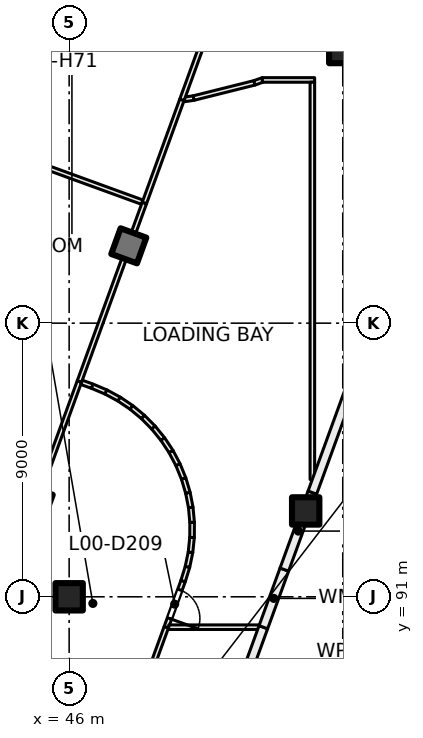
"""IFC4 building model, lengths in metres.
Left out: names, types, materials, properties, quantities, classifications, styles, units other than length and angle.
Written with IfcOpenShell. Run it as: python <this file> out.ifc"""

import sys

from ifc_helpers import new_model, si_unit, direction, frame, frame_2d, origin, origin_2d, place, context, subcontext, project, spatial, rectangle, extrude, element, fill, save


model = new_model("IFC4")
c1 = context("Model", 3, precision=1e-05, world=origin(), true_north=direction((0.0, 1.0)))
c2 = subcontext(c1, "Body", "Model", "MODEL_VIEW")
j1 = project(units=[si_unit("LENGTHUNIT", "METRE"), si_unit("PLANEANGLEUNIT", "RADIAN")], contexts=[c1])
p1 = place(None, origin())
s1 = spatial("IfcSite", under=j1, at=p1, CompositionType="ELEMENT")
p2 = place(p1, origin())
s2 = spatial("IfcBuilding", under=s1, at=p2, CompositionType="ELEMENT")
p3 = place(p2, origin())
s3 = spatial("IfcBuildingStorey", under=s2, at=p3, CompositionType="ELEMENT", Elevation=0.0)
for number, where, z_axis, x_axis in (
    (1, (46.0, 91.0, 0.0), (0.0, 0.0, 1.0), (1.0, 0.0, 0.0)),
    (2, (55.0, 109.0, 0.0), (0.0, 0.0, 1.0), (1.0, 0.0, 0.0)),
    (3, (53.78, 93.824, 0.0), (0.0, 0.0, 1.0), (1.0, 0.0, 0.0)),
    (4, (47.962, 102.544, 0.0), (0.0, 0.0, 1.0), (-0.342, -0.94, 0.0)),
    (5, (44.884, 94.087, 0.0), (0.0, 0.0, 1.0), (-0.342, -0.94, 0.0)),
):
    element("IfcColumn", number, at=place(p3, frame(where, z_axis=z_axis, x_axis=x_axis)), inside=s3, PredefinedType="COLUMN", context=c2, shape_type="SweptSolid", body=[
        extrude(rectangle(XDim=0.9, YDim=0.9, at=origin_2d()), origin(), (0.0, 0.0, 1.0), 7.5),
    ])
p4 = place(p3, frame((40.44, 106.878, 0.0), z_axis=(0.0, 0.0, 1.0), x_axis=(0.939697516706, -0.342006691597, 0.0)))
e6 = element("IfcWall", 6, at=p4, inside=s3, PredefinedType="PARTITIONING", context=c2, shape_type="SweptSolid", body=[
    extrude(rectangle(XDim=8.476, YDim=0.15, at=frame_2d((4.238, 0.0))), origin(), (0.0, 0.0, 1.0), 7.1),
])
p5 = place(p3, frame((44.627, 93.382, 0.0), z_axis=(0.0, 0.0, 1.0), x_axis=(0.342025351501, 0.939690725149, 0.0)))
e7 = element("IfcWall", 7, at=p5, inside=s3, PredefinedType="PARTITIONING", context=c2, shape_type="SweptSolid", body=[
    extrude(rectangle(XDim=5.0, YDim=0.15, at=frame_2d((2.5, 0.0))), origin(), (0.0, 0.0, 1.0), 7.1),
])
p6 = place(p3, frame((46.407, 98.054, 0.0), z_axis=(0.0, 0.0, 1.0), x_axis=(0.939944328342, -0.341327789109, 0.0)))
e8 = element("IfcWall", 8, at=p6, inside=s3, PredefinedType="PARTITIONING", context=c2, shape_type="SweptSolid", body=[
    extrude(rectangle(XDim=0.378, YDim=0.15, at=frame_2d((0.189, 0.0))), origin(), (0.0, 0.0, 1.0), 7.1),
])
p7 = place(p3, frame((46.337, 98.08, 0.0), z_axis=(0.0, 0.0, 1.0), x_axis=(0.342113136459, 0.939658768842, 0.0)))
e9 = element("IfcWall", 9, at=p7, inside=s3, PredefinedType="PARTITIONING", context=c2, shape_type="SweptSolid", body=[
    extrude(rectangle(XDim=6.25, YDim=0.15, at=frame_2d((3.125, 0.0))), origin(), (0.0, 0.0, 1.0), 7.1),
])
p8 = place(p3, frame((46.758, 97.927, 0.0), z_axis=(0.0, 0.0, 1.0), x_axis=(0.922024303007, -0.387131999019, 0.0)))
e10 = element("IfcWall", 10, at=p8, inside=s3, PredefinedType="PARTITIONING", context=c2, shape_type="SweptSolid", body=[
    extrude(rectangle(XDim=0.496, YDim=0.15, at=frame_2d((0.248, 0.0))), origin(), (0.0, 0.0, 1.0), 7.1),
])
p9 = place(p3, frame((47.209, 97.738, 0.0), z_axis=(0.0, 0.0, 1.0), x_axis=(0.878624509573, -0.47751332042, 0.0)))
e11 = element("IfcWall", 11, at=p9, inside=s3, PredefinedType="PARTITIONING", context=c2, shape_type="SweptSolid", body=[
    extrude(rectangle(XDim=0.499, YDim=0.15, at=frame_2d((0.249, 0.0))), origin(), (0.0, 0.0, 1.0), 7.1),
])
p10 = place(p3, frame((49.196, 90.0, 0.0), z_axis=(0.0, 0.0, 1.0), x_axis=(-0.34191897106, -0.939729438312, 0.0)))
e12 = element("IfcWall", 12, at=p10, inside=s3, PredefinedType="PARTITIONING", context=c2, shape_type="SweptSolid", body=[
    extrude(rectangle(XDim=5.46, YDim=0.15, at=frame_2d((2.73, 0.0))), origin(), (0.0, 0.0, 1.0), 7.1),
])
p11 = place(p10, frame((1.883, 0.0, 0.0)))
e13 = element("IfcOpeningElement", 13, at=p11, cuts=e12, PredefinedType="OPENING", context=c2, shape_type="SweptSolid", body=[
    extrude(rectangle(XDim=1.8, YDim=2.1, at=frame_2d((0.9, 1.05))), frame((0.0, 0.085, 0.0), z_axis=(0.0, -1.0, 0.0), x_axis=(1.0, 0.0, 0.0)), (0.0, 0.0, 1.0), 0.17),
])
p12 = place(p3, frame((47.641, 97.504, 0.0), z_axis=(0.0, 0.0, 1.0), x_axis=(0.829013848944, -0.559228073561, 0.0)))
e14 = element("IfcWall", 14, at=p12, inside=s3, PredefinedType="PARTITIONING", context=c2, shape_type="SweptSolid", body=[
    extrude(rectangle(XDim=0.497, YDim=0.15, at=frame_2d((0.249, 0.0))), origin(), (0.0, 0.0, 1.0), 7.1),
])
p13 = place(p3, frame((48.047, 97.23, 0.0), z_axis=(0.0, 0.0, 1.0), x_axis=(0.770145329221, -0.637868459699, 0.0)))
e15 = element("IfcWall", 15, at=p13, inside=s3, PredefinedType="PARTITIONING", context=c2, shape_type="SweptSolid", body=[
    extrude(rectangle(XDim=0.498, YDim=0.15, at=frame_2d((0.249, 0.0))), origin(), (0.0, 0.0, 1.0), 7.1),
])
p14 = place(p3, frame((48.425, 96.917, 0.0), z_axis=(0.0, 0.0, 1.0), x_axis=(0.702936615275, -0.711252497293, 0.0)))
e16 = element("IfcWall", 16, at=p14, inside=s3, PredefinedType="PARTITIONING", context=c2, shape_type="SweptSolid", body=[
    extrude(rectangle(XDim=0.499, YDim=0.15, at=frame_2d((0.25, 0.0))), origin(), (0.0, 0.0, 1.0), 7.1),
])
p15 = place(p3, frame((48.475, 103.953, 0.0), z_axis=(0.0, 0.0, 1.0), x_axis=(0.341992779494, 0.939702579955, 0.0)))
e17 = element("IfcWall", 17, at=p15, inside=s3, PredefinedType="PARTITIONING", context=c2, shape_type="SweptSolid", body=[
    extrude(rectangle(XDim=3.611, YDim=0.15, at=frame_2d((1.805, 0.0))), origin(), (0.0, 0.0, 1.0), 7.1),
])
for number, where, z_axis, x_axis in (
    (18, (48.771, 96.568, 0.0), (0.0, 0.0, 1.0), (0.629, -0.778, 0.0)),
    (19, (49.08, 96.187, 0.0), (0.0, 0.0, 1.0), (0.552, -0.834, 0.0)),
):
    element("IfcWall", number, at=place(p3, frame(where, z_axis=z_axis, x_axis=x_axis)), inside=s3, PredefinedType="PARTITIONING", context=c2, shape_type="SweptSolid", body=[
        extrude(rectangle(XDim=0.498, YDim=0.15, at=frame_2d((0.249, 0.0))), origin(), (0.0, 0.0, 1.0), 7.1),
    ])
p16 = place(p3, frame((49.749, 91.52, 0.0), z_axis=(0.0, 0.0, 1.0), x_axis=(-0.341876370555, -0.93974493734, 0.0)))
e20 = element("IfcWall", 20, at=p16, inside=s3, PredefinedType="PARTITIONING", context=c2, shape_type="SweptSolid", body=[
    extrude(rectangle(XDim=1.617, YDim=0.15, at=frame_2d((0.809, 0.0))), origin(), (0.0, 0.0, 1.0), 7.1),
])
p17 = place(p16, frame((0.311, 0.0, 0.0)))
e21 = element("IfcOpeningElement", 21, at=p17, cuts=e20, PredefinedType="OPENING", context=c2, shape_type="SweptSolid", body=[
    extrude(rectangle(XDim=1.0, YDim=2.1, at=frame_2d((0.5, 1.05))), frame((0.0, 0.085, 0.0), z_axis=(0.0, -1.0, 0.0), x_axis=(1.0, 0.0, 0.0)), (0.0, 0.0, 1.0), 0.17),
])
p18 = place(p3, frame((49.276, 90.0, 0.0), z_axis=(0.0, 0.0, 1.0), x_axis=(1.0, 0.0, 0.0)))
e22 = element("IfcWall", 22, at=p18, inside=s3, PredefinedType="PARTITIONING", context=c2, shape_type="SweptSolid", body=[
    extrude(rectangle(XDim=2.952, YDim=0.15, at=frame_2d((1.476, 0.0))), origin(), (0.0, 0.0, 1.0), 7.1),
])
p19 = place(p3, frame((49.351, 95.778, 0.0), z_axis=(0.0, 0.0, 1.0), x_axis=(0.46615085347, -0.884705251374, 0.0)))
e23 = element("IfcWall", 23, at=p19, inside=s3, PredefinedType="PARTITIONING", context=c2, shape_type="SweptSolid", body=[
    extrude(rectangle(XDim=0.498, YDim=0.15, at=frame_2d((0.249, 0.0))), origin(), (0.0, 0.0, 1.0), 7.1),
])
p20 = place(p3, frame((49.58, 95.344, 0.0), z_axis=(0.0, 0.0, 1.0), x_axis=(0.378326719955, -0.925672130383, 0.0)))
e24 = element("IfcWall", 24, at=p20, inside=s3, PredefinedType="PARTITIONING", context=c2, shape_type="SweptSolid", body=[
    extrude(rectangle(XDim=0.497, YDim=0.15, at=frame_2d((0.249, 0.0))), origin(), (0.0, 0.0, 1.0), 7.1),
])
p21 = place(p3, frame((49.794, 107.359, 0.0), z_axis=(0.0, 0.0, 1.0), x_axis=(0.988901730308, 0.148571086668, 0.0)))
e25 = element("IfcWall", 25, at=p21, inside=s3, PredefinedType="PARTITIONING", context=c2, shape_type="SweptSolid", body=[
    extrude(rectangle(XDim=0.311, YDim=0.15, at=frame_2d((0.155, 0.0))), origin(), (0.0, 0.0, 1.0), 7.1),
])
p22 = place(p3, frame((49.71, 107.346, 0.0), z_axis=(0.0, 0.0, 1.0), x_axis=(0.341943087223, 0.939720663336, 0.0)))
e26 = element("IfcWall", 26, at=p22, inside=s3, PredefinedType="PARTITIONING", context=c2, shape_type="SweptSolid", body=[
    extrude(rectangle(XDim=5.39, YDim=0.15, at=frame_2d((2.695, 0.0))), origin(), (0.0, 0.0, 1.0), 7.1),
])
p23 = place(p3, frame((49.747, 91.516, 0.0), z_axis=(0.0, 0.0, 1.0), x_axis=(0.296228958727, 0.955116958289, 0.0)))
e27 = element("IfcWall", 27, at=p23, inside=s3, PredefinedType="PARTITIONING", context=c2, shape_type="SweptSolid", body=[
    extrude(rectangle(XDim=0.496, YDim=0.15, at=frame_2d((0.248, 0.0))), origin(), (0.0, 0.0, 1.0), 7.1),
])
p24 = place(p3, frame((49.766, 94.891, 0.0), z_axis=(0.0, 0.0, 1.0), x_axis=(0.283938571221, -0.958842472867, 0.0)))
e28 = element("IfcWall", 28, at=p24, inside=s3, PredefinedType="PARTITIONING", context=c2, shape_type="SweptSolid", body=[
    extrude(rectangle(XDim=0.5, YDim=0.15, at=frame_2d((0.25, 0.0))), origin(), (0.0, 0.0, 1.0), 7.1),
])
p25 = place(p3, frame((49.892, 91.983, 0.0), z_axis=(0.0, 0.0, 1.0), x_axis=(0.202330199798, 0.979317359312, 0.0)))
e29 = element("IfcWall", 29, at=p25, inside=s3, PredefinedType="PARTITIONING", context=c2, shape_type="SweptSolid", body=[
    extrude(rectangle(XDim=0.498, YDim=0.15, at=frame_2d((0.249, 0.0))), origin(), (0.0, 0.0, 1.0), 7.1),
])
p26 = place(p3, frame((49.906, 94.42, 0.0), z_axis=(0.0, 0.0, 1.0), x_axis=(0.190646652196, -0.981658725834, 0.0)))
e30 = element("IfcWall", 30, at=p26, inside=s3, PredefinedType="PARTITIONING", context=c2, shape_type="SweptSolid", body=[
    extrude(rectangle(XDim=0.498, YDim=0.15, at=frame_2d((0.249, 0.0))), origin(), (0.0, 0.0, 1.0), 7.1),
])
p27 = place(p3, frame((49.992, 92.463, 0.0), z_axis=(0.0, 0.0, 1.0), x_axis=(0.102314560958, 0.994752095055, 0.0)))
e31 = element("IfcWall", 31, at=p27, inside=s3, PredefinedType="PARTITIONING", context=c2, shape_type="SweptSolid", body=[
    extrude(rectangle(XDim=0.499, YDim=0.15, at=frame_2d((0.25, 0.0))), origin(), (0.0, 0.0, 1.0), 7.1),
])
for number, where, z_axis, x_axis in (
    (32, (50.0, 93.939, 0.0), (0.0, 0.0, 1.0), (0.09, -0.996, 0.0)),
    (33, (50.043, 92.951, 0.0), (0.0, 0.0, 1.0), (0.004, 1.0, 0.0)),
):
    element("IfcWall", number, at=place(p3, frame(where, z_axis=z_axis, x_axis=x_axis)), inside=s3, PredefinedType="PARTITIONING", context=c2, shape_type="SweptSolid", body=[
        extrude(rectangle(XDim=0.499, YDim=0.15, at=frame_2d((0.25, 0.0))), origin(), (0.0, 0.0, 1.0), 7.1),
    ])
p28 = place(p3, frame((52.388, 90.0, 0.0), z_axis=(0.0, 0.0, 1.0), x_axis=(-0.342015169862, -0.939694430964, 0.0)))
e34 = element("IfcWall", 34, at=p28, inside=s3, PredefinedType="PARTITIONING", context=c2, shape_type="SweptSolid", body=[
    extrude(rectangle(XDim=6.771, YDim=0.3, at=frame_2d((3.386, 0.0))), origin(), (0.0, 0.0, 1.0), 11.1),
])
p29 = place(p28, frame((2.383, 0.0, 0.0)))
e35 = element("IfcOpeningElement", 35, at=p29, cuts=e34, PredefinedType="OPENING", context=c2, shape_type="SweptSolid", body=[
    extrude(rectangle(XDim=1.0, YDim=2.1, at=frame_2d((0.5, 1.05))), frame((0.0, 0.16, 0.0), z_axis=(0.0, -1.0, 0.0), x_axis=(1.0, 0.0, 0.0)), (0.0, 0.0, 1.0), 0.32),
])
p30 = place(p3, frame((50.093, 107.403, 0.0), z_axis=(0.0, 0.0, 1.0), x_axis=(0.970121672102, 0.24261892201, 0.0)))
e36 = element("IfcWall", 36, at=p30, inside=s3, PredefinedType="PARTITIONING", context=c2, shape_type="SweptSolid", body=[
    extrude(rectangle(XDim=2.069, YDim=0.15, at=frame_2d((1.034, 0.0))), origin(), (0.0, 0.0, 1.0), 7.1),
])
p31 = place(p3, frame((52.093, 107.903, 0.0), z_axis=(0.0, 0.0, 1.0), x_axis=(0.941980718737, 0.335666986056, 0.0)))
e37 = element("IfcWall", 37, at=p31, inside=s3, PredefinedType="PARTITIONING", context=c2, shape_type="SweptSolid", body=[
    extrude(rectangle(XDim=0.3, YDim=0.15, at=frame_2d((0.15, 0.0))), origin(), (0.0, 0.0, 1.0), 7.1),
])
p32 = place(p3, frame((52.351, 108.0, 0.0), z_axis=(0.0, 0.0, 1.0), x_axis=(1.0, 0.0, 0.0)))
e38 = element("IfcWall", 38, at=p32, inside=s3, PredefinedType="PARTITIONING", context=c2, shape_type="SweptSolid", body=[
    extrude(rectangle(XDim=1.724, YDim=0.15, at=frame_2d((0.862, 0.0))), origin(), (0.0, 0.0, 1.0), 7.1),
])
p33 = place(p3, frame((52.388, 90.0, 0.0), z_axis=(0.0, 0.0, 1.0), x_axis=(0.342112398827, 0.939659037401, 0.0)))
e39 = element("IfcWall", 39, at=p33, inside=s3, PredefinedType="PARTITIONING", context=c2, shape_type="SweptSolid", body=[
    extrude(rectangle(XDim=2.017, YDim=0.3, at=frame_2d((1.008, 0.0))), origin(), (0.0, 0.0, 1.0), 11.1),
])
p34 = place(p3, frame((53.078, 91.895, 0.0), z_axis=(0.0, 0.0, 1.0), x_axis=(0.342084828481, 0.939669074793, 0.0)))
e40 = element("IfcWall", 40, at=p34, inside=s3, PredefinedType="PARTITIONING", context=c2, shape_type="SweptSolid", body=[
    extrude(rectangle(XDim=2.696, YDim=0.3, at=frame_2d((1.348, 0.0))), origin(), (0.0, 0.0, 1.0), 11.1),
])
p35 = place(p3, frame((54.0, 94.857, 0.0), z_axis=(0.0, 0.0, 1.0), x_axis=(0.0, 1.0, 0.0)))
e41 = element("IfcWall", 41, at=p35, inside=s3, PredefinedType="PARTITIONING", context=c2, shape_type="SweptSolid", body=[
    extrude(rectangle(XDim=13.068, YDim=0.15, at=frame_2d((6.534, 0.0))), origin(), (0.0, 0.0, 1.0), 7.1),
])
p36 = place(p3, frame((54.0, 94.428, 0.0), z_axis=(0.0, 0.0, 1.0), x_axis=(0.342028064794, 0.939689737569, 0.0)))
e42 = element("IfcWall", 42, at=p36, inside=s3, PredefinedType="PARTITIONING", context=c2, shape_type="SweptSolid", body=[
    extrude(rectangle(XDim=14.443, YDim=0.3, at=frame_2d((7.222, 0.0))), origin(), (0.0, 0.0, 1.0), 11.1),
])
p37 = place(p17, origin())
e43 = element("IfcDoor", 43, at=p37, inside=s3, OperationType="SINGLE_SWING_RIGHT", PredefinedType="DOOR", context=c2, shape_type="SweptSolid", body=[
    extrude(rectangle(XDim=1.0, YDim=2.1, at=frame_2d((0.5, 1.05))), frame((0.0, 0.025, 0.0), z_axis=(0.0, -1.0, 0.0), x_axis=(1.0, 0.0, 0.0)), (0.0, 0.0, 1.0), 0.05),
])
fill(e21, e43)
save(model, sys.argv[1])
